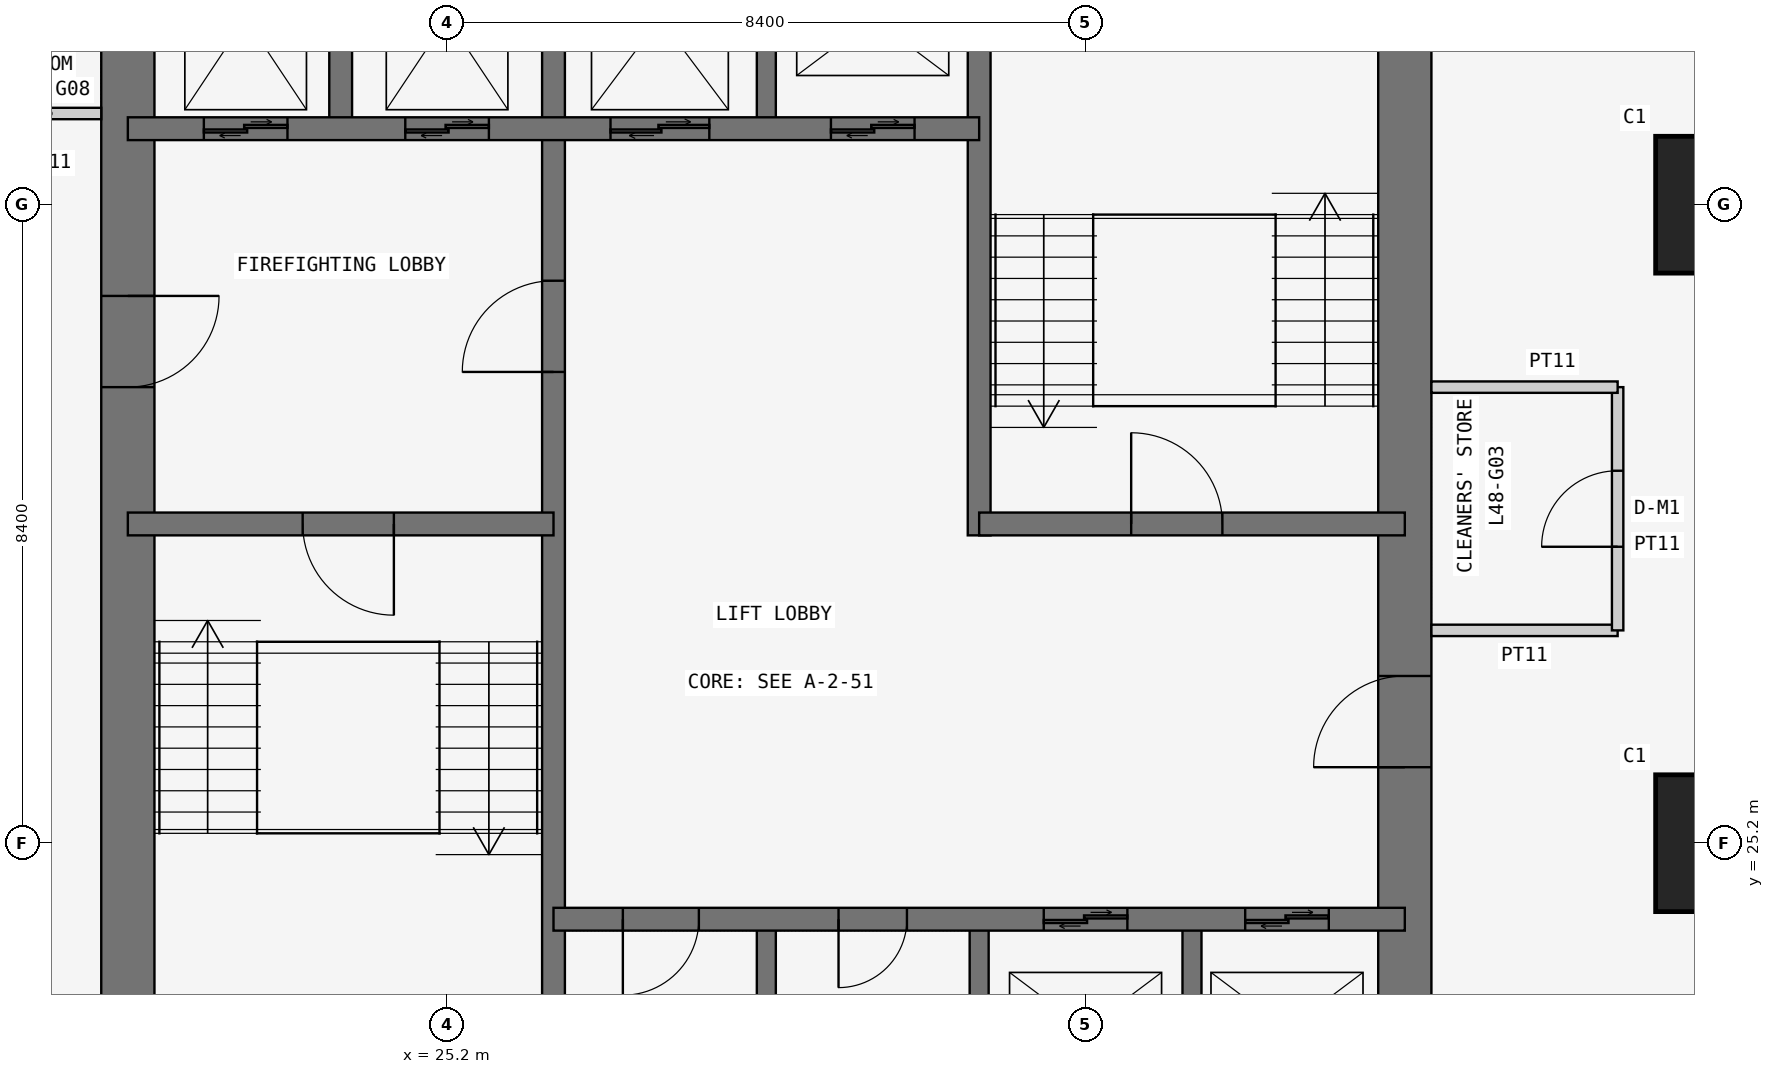
"""IFC4 building model, lengths in metres.
Left out: names, types, materials, properties, quantities, classifications, styles, units other than length and angle.
Written with IfcOpenShell. Run it as: python <this file> out.ifc"""

import sys

from ifc_helpers import new_model, si_unit, direction, frame, frame_2d, origin, origin_2d, place, context, subcontext, project, spatial, rectangle, extrude, element, fill, save


model = new_model("IFC4")
c1 = context("Model", 3, precision=1e-05, world=origin(), true_north=direction((0.0, 1.0)))
c2 = subcontext(c1, "Body", "Model", "MODEL_VIEW")
j1 = project(units=[si_unit("LENGTHUNIT", "METRE"), si_unit("PLANEANGLEUNIT", "RADIAN")], contexts=[c1])
p1 = place(None, origin())
s1 = spatial("IfcSite", under=j1, at=p1, CompositionType="ELEMENT")
p2 = place(p1, origin())
s2 = spatial("IfcBuilding", under=s1, at=p2, CompositionType="ELEMENT")
p3 = place(p2, frame((0.0, 0.0, 186.9)))
s3 = spatial("IfcBuildingStorey", under=s2, at=p3, CompositionType="ELEMENT", Elevation=186.9)
for number, where, z_axis, x_axis in (
    (1, (42.0, 25.2, 0.0), (0.0, 0.0, 1.0), (1.0, 0.0, 0.0)),
    (2, (42.0, 33.6, 0.0), (0.0, 0.0, 1.0), (1.0, 0.0, 0.0)),
):
    element("IfcColumn", number, at=place(p3, frame(where, z_axis=z_axis, x_axis=x_axis)), inside=s3, PredefinedType="COLUMN", context=c2, shape_type="SweptSolid", body=[
        extrude(rectangle(XDim=1.8, YDim=1.8, at=origin_2d()), origin(), (0.0, 0.0, 1.0), 3.6),
    ])
p4 = place(p3, frame((37.8, 21.0, 0.0), z_axis=(0.0, 0.0, 1.0), x_axis=(0.0, 1.0, 0.0)))
e3 = element("IfcWall", 3, at=p4, inside=s3, PredefinedType="SHEAR", context=c2, shape_type="SweptSolid", body=[
    extrude(rectangle(XDim=17.15, YDim=0.7, at=frame_2d((8.575, 0.0))), origin(), (0.0, 0.0, 1.0), 3.6),
])
p5 = place(p4, frame((5.2, 0.0, 0.0)))
e4 = element("IfcOpeningElement", 4, at=p5, cuts=e3, PredefinedType="OPENING", context=c2, shape_type="SweptSolid", body=[
    extrude(rectangle(XDim=1.2, YDim=2.1, at=frame_2d((0.6, 1.05))), frame((0.0, 0.36, 0.0), z_axis=(0.0, -1.0, 0.0), x_axis=(1.0, 0.0, 0.0)), (0.0, 0.0, 1.0), 0.72),
])
p6 = place(p3, frame((21.0, 37.8, 0.0), z_axis=(0.0, 0.0, 1.0), x_axis=(0.0, -1.0, 0.0)))
e5 = element("IfcWall", 5, at=p6, inside=s3, PredefinedType="SHEAR", context=c2, shape_type="SweptSolid", body=[
    extrude(rectangle(XDim=17.15, YDim=0.7, at=frame_2d((8.575, 0.0))), origin(), (0.0, 0.0, 1.0), 3.6),
])
p7 = place(p6, frame((5.4, 0.0, 0.0)))
e6 = element("IfcOpeningElement", 6, at=p7, cuts=e5, PredefinedType="OPENING", context=c2, shape_type="SweptSolid", body=[
    extrude(rectangle(XDim=1.2, YDim=2.1, at=frame_2d((0.6, 1.05))), frame((0.0, 0.36, 0.0), z_axis=(0.0, -1.0, 0.0), x_axis=(1.0, 0.0, 0.0)), (0.0, 0.0, 1.0), 0.72),
])
p8 = place(p3, frame((26.6, 21.0, 0.0), z_axis=(0.0, 0.0, 1.0), x_axis=(0.0, 1.0, 0.0)))
e7 = element("IfcWall", 7, at=p8, inside=s3, PredefinedType="SHEAR", context=c2, shape_type="SweptSolid", body=[
    extrude(rectangle(XDim=16.8, YDim=0.3, at=frame_2d((8.4, 0.0))), origin(), (0.0, 0.0, 1.0), 3.6),
])
p9 = place(p8, frame((10.4, 0.0, 0.0)))
e8 = element("IfcOpeningElement", 8, at=p9, cuts=e7, PredefinedType="OPENING", context=c2, shape_type="SweptSolid", body=[
    extrude(rectangle(XDim=1.2, YDim=2.1, at=frame_2d((0.6, 1.05))), frame((0.0, 0.16, 0.0), z_axis=(0.0, -1.0, 0.0), x_axis=(1.0, 0.0, 0.0)), (0.0, 0.0, 1.0), 0.32),
])
p10 = place(p3, frame((21.0, 29.4, 0.0), z_axis=(0.0, 0.0, 1.0), x_axis=(1.0, 0.0, 0.0)))
e9 = element("IfcWall", 9, at=p10, inside=s3, PredefinedType="SHEAR", context=c2, shape_type="SweptSolid", body=[
    extrude(rectangle(XDim=5.6, YDim=0.3, at=frame_2d((2.8, 0.0))), origin(), (0.0, 0.0, 1.0), 3.6),
])
p11 = place(p10, frame((2.3, 0.0, 0.0)))
e10 = element("IfcOpeningElement", 10, at=p11, cuts=e9, PredefinedType="OPENING", context=c2, shape_type="SweptSolid", body=[
    extrude(rectangle(XDim=1.2, YDim=2.1, at=frame_2d((0.6, 1.05))), frame((0.0, 0.16, 0.0), z_axis=(0.0, -1.0, 0.0), x_axis=(1.0, 0.0, 0.0)), (0.0, 0.0, 1.0), 0.32),
])
p12 = place(p3, frame((21.0, 34.6, 0.0), z_axis=(0.0, 0.0, 1.0), x_axis=(1.0, 0.0, 0.0)))
e11 = element("IfcWall", 11, at=p12, inside=s3, PredefinedType="SHEAR", context=c2, shape_type="SweptSolid", body=[
    extrude(rectangle(XDim=11.2, YDim=0.3, at=frame_2d((5.6, 0.0))), origin(), (0.0, 0.0, 1.0), 3.6),
])
p13 = place(p12, frame((9.25, 0.0, 0.0)))
e12 = element("IfcOpeningElement", 12, at=p13, cuts=e11, PredefinedType="OPENING", context=c2, shape_type="SweptSolid", body=[
    extrude(rectangle(XDim=1.1, YDim=2.1, at=frame_2d((0.55, 1.05))), frame((0.0, 0.16, 0.0), z_axis=(0.0, -1.0, 0.0), x_axis=(1.0, 0.0, 0.0)), (0.0, 0.0, 1.0), 0.32),
])
p14 = place(p12, frame((1.0, 0.0, 0.0)))
e13 = element("IfcOpeningElement", 13, at=p14, cuts=e11, PredefinedType="OPENING", context=c2, shape_type="SweptSolid", body=[
    extrude(rectangle(XDim=1.1, YDim=2.1, at=frame_2d((0.55, 1.05))), frame((0.0, 0.16, 0.0), z_axis=(0.0, -1.0, 0.0), x_axis=(1.0, 0.0, 0.0)), (0.0, 0.0, 1.0), 0.32),
])
p15 = place(p12, frame((3.65, 0.0, 0.0)))
e14 = element("IfcOpeningElement", 14, at=p15, cuts=e11, PredefinedType="OPENING", context=c2, shape_type="SweptSolid", body=[
    extrude(rectangle(XDim=1.1, YDim=2.1, at=frame_2d((0.55, 1.05))), frame((0.0, 0.16, 0.0), z_axis=(0.0, -1.0, 0.0), x_axis=(1.0, 0.0, 0.0)), (0.0, 0.0, 1.0), 0.32),
])
p16 = place(p12, frame((6.35, 0.0, 0.0)))
e15 = element("IfcOpeningElement", 15, at=p16, cuts=e11, PredefinedType="OPENING", context=c2, shape_type="SweptSolid", body=[
    extrude(rectangle(XDim=1.3, YDim=2.1, at=frame_2d((0.65, 1.05))), frame((0.0, 0.16, 0.0), z_axis=(0.0, -1.0, 0.0), x_axis=(1.0, 0.0, 0.0)), (0.0, 0.0, 1.0), 0.32),
])
p17 = place(p3, frame((23.8, 34.6, 0.0), z_axis=(0.0, 0.0, 1.0), x_axis=(0.0, 1.0, 0.0)))
e16 = element("IfcWall", 16, at=p17, inside=s3, PredefinedType="SHEAR", context=c2, shape_type="SweptSolid", body=[
    extrude(rectangle(XDim=3.2, YDim=0.3, at=frame_2d((1.6, 0.0))), origin(), (0.0, 0.0, 1.0), 3.6),
])
p18 = place(p3, frame((26.6, 24.2, 0.0), z_axis=(0.0, 0.0, 1.0), x_axis=(1.0, 0.0, 0.0)))
e17 = element("IfcWall", 17, at=p18, inside=s3, PredefinedType="SHEAR", context=c2, shape_type="SweptSolid", body=[
    extrude(rectangle(XDim=11.2, YDim=0.3, at=frame_2d((5.6, 0.0))), origin(), (0.0, 0.0, 1.0), 3.6),
])
p19 = place(p18, frame((0.913, 0.0, 0.0)))
e18 = element("IfcOpeningElement", 18, at=p19, cuts=e17, PredefinedType="OPENING", context=c2, shape_type="SweptSolid", body=[
    extrude(rectangle(XDim=1.0, YDim=2.1, at=frame_2d((0.5, 1.05))), frame((0.0, 0.16, 0.0), z_axis=(0.0, -1.0, 0.0), x_axis=(1.0, 0.0, 0.0)), (0.0, 0.0, 1.0), 0.32),
])
p20 = place(p18, frame((3.75, 0.0, 0.0)))
e19 = element("IfcOpeningElement", 19, at=p20, cuts=e17, PredefinedType="OPENING", context=c2, shape_type="SweptSolid", body=[
    extrude(rectangle(XDim=0.9, YDim=2.1, at=frame_2d((0.45, 1.05))), frame((0.0, 0.16, 0.0), z_axis=(0.0, -1.0, 0.0), x_axis=(1.0, 0.0, 0.0)), (0.0, 0.0, 1.0), 0.32),
])
p21 = place(p18, frame((6.45, 0.0, 0.0)))
e20 = element("IfcOpeningElement", 20, at=p21, cuts=e17, PredefinedType="OPENING", context=c2, shape_type="SweptSolid", body=[
    extrude(rectangle(XDim=1.1, YDim=2.1, at=frame_2d((0.55, 1.05))), frame((0.0, 0.16, 0.0), z_axis=(0.0, -1.0, 0.0), x_axis=(1.0, 0.0, 0.0)), (0.0, 0.0, 1.0), 0.32),
])
p22 = place(p18, frame((9.1, 0.0, 0.0)))
e21 = element("IfcOpeningElement", 21, at=p22, cuts=e17, PredefinedType="OPENING", context=c2, shape_type="SweptSolid", body=[
    extrude(rectangle(XDim=1.1, YDim=2.1, at=frame_2d((0.55, 1.05))), frame((0.0, 0.16, 0.0), z_axis=(0.0, -1.0, 0.0), x_axis=(1.0, 0.0, 0.0)), (0.0, 0.0, 1.0), 0.32),
])
p23 = place(p3, frame((32.2, 29.25, 0.0), z_axis=(0.0, 0.0, 1.0), x_axis=(0.0, 1.0, 0.0)))
e22 = element("IfcWall", 22, at=p23, inside=s3, PredefinedType="SHEAR", context=c2, shape_type="SweptSolid", body=[
    extrude(rectangle(XDim=8.55, YDim=0.3, at=frame_2d((4.275, 0.0))), origin(), (0.0, 0.0, 1.0), 3.6),
])
p24 = place(p3, frame((32.2, 29.4, 0.0), z_axis=(0.0, 0.0, 1.0), x_axis=(1.0, 0.0, 0.0)))
e23 = element("IfcWall", 23, at=p24, inside=s3, PredefinedType="SHEAR", context=c2, shape_type="SweptSolid", body=[
    extrude(rectangle(XDim=5.6, YDim=0.3, at=frame_2d((2.8, 0.0))), origin(), (0.0, 0.0, 1.0), 3.6),
])
p25 = place(p24, frame((2.0, 0.0, 0.0)))
e24 = element("IfcOpeningElement", 24, at=p25, cuts=e23, PredefinedType="OPENING", context=c2, shape_type="SweptSolid", body=[
    extrude(rectangle(XDim=1.2, YDim=2.1, at=frame_2d((0.6, 1.05))), frame((0.0, 0.16, 0.0), z_axis=(0.0, -1.0, 0.0), x_axis=(1.0, 0.0, 0.0)), (0.0, 0.0, 1.0), 0.32),
])
for number, where, z_axis, x_axis in (
    (25, (29.4, 21.0, 0.0), (0.0, 0.0, 1.0), (0.0, 1.0, 0.0)),
    (26, (32.2, 21.0, 0.0), (0.0, 0.0, 1.0), (0.0, 1.0, 0.0)),
    (27, (35.0, 21.0, 0.0), (0.0, 0.0, 1.0), (0.0, 1.0, 0.0)),
    (28, (29.4, 34.6, 0.0), (0.0, 0.0, 1.0), (0.0, 1.0, 0.0)),
):
    element("IfcWall", number, at=place(p3, frame(where, z_axis=z_axis, x_axis=x_axis)), inside=s3, PredefinedType="SHEAR", context=c2, shape_type="SweptSolid", body=[
        extrude(rectangle(XDim=3.2, YDim=0.25, at=frame_2d((1.6, 0.0))), origin(), (0.0, 0.0, 1.0), 3.6),
    ])
p26 = place(p3, frame((38.15, 28.0, 0.0), z_axis=(0.0, 0.0, 1.0), x_axis=(1.0, 0.0, 0.0)))
e29 = element("IfcWall", 29, at=p26, inside=s3, PredefinedType="PARTITIONING", context=c2, shape_type="SweptSolid", body=[
    extrude(rectangle(XDim=2.45, YDim=0.15, at=frame_2d((1.225, 0.0))), origin(), (0.0, 0.0, 1.0), 3.45),
])
p27 = place(p3, frame((40.6, 28.0, 0.0), z_axis=(0.0, 0.0, 1.0), x_axis=(0.0, 1.0, 0.0)))
e30 = element("IfcWall", 30, at=p27, inside=s3, PredefinedType="PARTITIONING", context=c2, shape_type="SweptSolid", body=[
    extrude(rectangle(XDim=3.2, YDim=0.15, at=frame_2d((1.6, 0.0))), origin(), (0.0, 0.0, 1.0), 3.45),
])
p28 = place(p27, frame((1.1, 0.0, 0.0)))
e31 = element("IfcOpeningElement", 31, at=p28, cuts=e30, PredefinedType="OPENING", context=c2, shape_type="SweptSolid", body=[
    extrude(rectangle(XDim=1.0, YDim=2.1, at=frame_2d((0.5, 1.05))), frame((0.0, 0.085, 0.0), z_axis=(0.0, -1.0, 0.0), x_axis=(1.0, 0.0, 0.0)), (0.0, 0.0, 1.0), 0.17),
])
p29 = place(p3, frame((40.6, 31.2, 0.0), z_axis=(0.0, 0.0, 1.0), x_axis=(-1.0, 0.0, 0.0)))
e32 = element("IfcWall", 32, at=p29, inside=s3, PredefinedType="PARTITIONING", context=c2, shape_type="SweptSolid", body=[
    extrude(rectangle(XDim=2.45, YDim=0.15, at=frame_2d((1.225, 0.0))), origin(), (0.0, 0.0, 1.0), 3.45),
])
p30 = place(p3, frame((19.25, 34.8, 0.0), z_axis=(0.0, 0.0, 1.0), x_axis=(1.0, 0.0, 0.0)))
e33 = element("IfcWall", 33, at=p30, inside=s3, PredefinedType="PARTITIONING", context=c2, shape_type="SweptSolid", body=[
    extrude(rectangle(XDim=1.4, YDim=0.15, at=frame_2d((0.7, 0.0))), origin(), (0.0, 0.0, 1.0), 3.45),
])
p31 = place(p28, origin())
e34 = element("IfcDoor", 34, at=p31, inside=s3, OperationType="SINGLE_SWING_LEFT", PredefinedType="DOOR", context=c2, shape_type="SweptSolid", body=[
    extrude(rectangle(XDim=1.0, YDim=2.1, at=frame_2d((0.5, 1.05))), frame((0.0, 0.025, 0.0), z_axis=(0.0, -1.0, 0.0), x_axis=(1.0, 0.0, 0.0)), (0.0, 0.0, 1.0), 0.05),
])
fill(e31, e34)
p32 = place(p7, origin())
e35 = element("IfcDoor", 35, at=p32, inside=s3, OperationType="SINGLE_SWING_LEFT", PredefinedType="DOOR", context=c2, shape_type="SweptSolid", body=[
    extrude(rectangle(XDim=1.2, YDim=2.1, at=frame_2d((0.6, 1.05))), frame((0.0, 0.025, 0.0), z_axis=(0.0, -1.0, 0.0), x_axis=(1.0, 0.0, 0.0)), (0.0, 0.0, 1.0), 0.05),
])
fill(e6, e35)
p33 = place(p11, frame((1.2, 0.0, 0.0), z_axis=(0.0, 0.0, 1.0), x_axis=(-1.0, 0.0, 0.0)))
e36 = element("IfcDoor", 36, at=p33, inside=s3, OperationType="SINGLE_SWING_LEFT", PredefinedType="DOOR", context=c2, shape_type="SweptSolid", body=[
    extrude(rectangle(XDim=1.2, YDim=2.1, at=frame_2d((0.6, 1.05))), frame((0.0, 0.025, 0.0), z_axis=(0.0, -1.0, 0.0), x_axis=(1.0, 0.0, 0.0)), (0.0, 0.0, 1.0), 0.05),
])
fill(e10, e36)
p34 = place(p9, origin())
e37 = element("IfcDoor", 37, at=p34, inside=s3, OperationType="SINGLE_SWING_LEFT", PredefinedType="DOOR", context=c2, shape_type="SweptSolid", body=[
    extrude(rectangle(XDim=1.2, YDim=2.1, at=frame_2d((0.6, 1.05))), frame((0.0, 0.025, 0.0), z_axis=(0.0, -1.0, 0.0), x_axis=(1.0, 0.0, 0.0)), (0.0, 0.0, 1.0), 0.05),
])
fill(e8, e37)
p35 = place(p5, origin())
e38 = element("IfcDoor", 38, at=p35, inside=s3, OperationType="SINGLE_SWING_LEFT", PredefinedType="DOOR", context=c2, shape_type="SweptSolid", body=[
    extrude(rectangle(XDim=1.2, YDim=2.1, at=frame_2d((0.6, 1.05))), frame((0.0, 0.025, 0.0), z_axis=(0.0, -1.0, 0.0), x_axis=(1.0, 0.0, 0.0)), (0.0, 0.0, 1.0), 0.05),
])
fill(e4, e38)
p36 = place(p25, origin())
e39 = element("IfcDoor", 39, at=p36, inside=s3, OperationType="SINGLE_SWING_LEFT", PredefinedType="DOOR", context=c2, shape_type="SweptSolid", body=[
    extrude(rectangle(XDim=1.2, YDim=2.1, at=frame_2d((0.6, 1.05))), frame((0.0, 0.025, 0.0), z_axis=(0.0, -1.0, 0.0), x_axis=(1.0, 0.0, 0.0)), (0.0, 0.0, 1.0), 0.05),
])
fill(e24, e39)
p37 = place(p19, frame((1.0, 0.0, 0.0), z_axis=(0.0, 0.0, 1.0), x_axis=(-1.0, 0.0, 0.0)))
e40 = element("IfcDoor", 40, at=p37, inside=s3, OperationType="SINGLE_SWING_RIGHT", PredefinedType="DOOR", context=c2, shape_type="SweptSolid", body=[
    extrude(rectangle(XDim=1.0, YDim=2.1, at=frame_2d((0.5, 1.05))), frame((0.0, 0.025, 0.0), z_axis=(0.0, -1.0, 0.0), x_axis=(1.0, 0.0, 0.0)), (0.0, 0.0, 1.0), 0.05),
])
fill(e18, e40)
p38 = place(p20, frame((0.9, 0.0, 0.0), z_axis=(0.0, 0.0, 1.0), x_axis=(-1.0, 0.0, 0.0)))
e41 = element("IfcDoor", 41, at=p38, inside=s3, OperationType="SINGLE_SWING_RIGHT", PredefinedType="DOOR", context=c2, shape_type="SweptSolid", body=[
    extrude(rectangle(XDim=0.9, YDim=2.1, at=frame_2d((0.45, 1.05))), frame((0.0, 0.025, 0.0), z_axis=(0.0, -1.0, 0.0), x_axis=(1.0, 0.0, 0.0)), (0.0, 0.0, 1.0), 0.05),
])
fill(e19, e41)
p39 = place(p21, origin())
e42 = element("IfcDoor", 42, at=p39, inside=s3, OperationType="DOUBLE_DOOR_SLIDING", PredefinedType="DOOR", context=c2, shape_type="SweptSolid", body=[
    extrude(rectangle(XDim=1.1, YDim=2.1, at=frame_2d((0.55, 1.05))), frame((0.0, 0.025, 0.0), z_axis=(0.0, -1.0, 0.0), x_axis=(1.0, 0.0, 0.0)), (0.0, 0.0, 1.0), 0.05),
])
fill(e20, e42)
p40 = place(p22, origin())
e43 = element("IfcDoor", 43, at=p40, inside=s3, OperationType="DOUBLE_DOOR_SLIDING", PredefinedType="DOOR", context=c2, shape_type="SweptSolid", body=[
    extrude(rectangle(XDim=1.1, YDim=2.1, at=frame_2d((0.55, 1.05))), frame((0.0, 0.025, 0.0), z_axis=(0.0, -1.0, 0.0), x_axis=(1.0, 0.0, 0.0)), (0.0, 0.0, 1.0), 0.05),
])
fill(e21, e43)
p41 = place(p13, origin())
e44 = element("IfcDoor", 44, at=p41, inside=s3, OperationType="DOUBLE_DOOR_SLIDING", PredefinedType="DOOR", context=c2, shape_type="SweptSolid", body=[
    extrude(rectangle(XDim=1.1, YDim=2.1, at=frame_2d((0.55, 1.05))), frame((0.0, 0.025, 0.0), z_axis=(0.0, -1.0, 0.0), x_axis=(1.0, 0.0, 0.0)), (0.0, 0.0, 1.0), 0.05),
])
fill(e12, e44)
p42 = place(p14, origin())
e45 = element("IfcDoor", 45, at=p42, inside=s3, OperationType="DOUBLE_DOOR_SLIDING", PredefinedType="DOOR", context=c2, shape_type="SweptSolid", body=[
    extrude(rectangle(XDim=1.1, YDim=2.1, at=frame_2d((0.55, 1.05))), frame((0.0, 0.025, 0.0), z_axis=(0.0, -1.0, 0.0), x_axis=(1.0, 0.0, 0.0)), (0.0, 0.0, 1.0), 0.05),
])
fill(e13, e45)
p43 = place(p15, origin())
e46 = element("IfcDoor", 46, at=p43, inside=s3, OperationType="DOUBLE_DOOR_SLIDING", PredefinedType="DOOR", context=c2, shape_type="SweptSolid", body=[
    extrude(rectangle(XDim=1.1, YDim=2.1, at=frame_2d((0.55, 1.05))), frame((0.0, 0.025, 0.0), z_axis=(0.0, -1.0, 0.0), x_axis=(1.0, 0.0, 0.0)), (0.0, 0.0, 1.0), 0.05),
])
fill(e14, e46)
p44 = place(p16, origin())
e47 = element("IfcDoor", 47, at=p44, inside=s3, OperationType="DOUBLE_DOOR_SLIDING", PredefinedType="DOOR", context=c2, shape_type="SweptSolid", body=[
    extrude(rectangle(XDim=1.3, YDim=2.1, at=frame_2d((0.65, 1.05))), frame((0.0, 0.025, 0.0), z_axis=(0.0, -1.0, 0.0), x_axis=(1.0, 0.0, 0.0)), (0.0, 0.0, 1.0), 0.05),
])
fill(e15, e47)
save(model, sys.argv[1])
